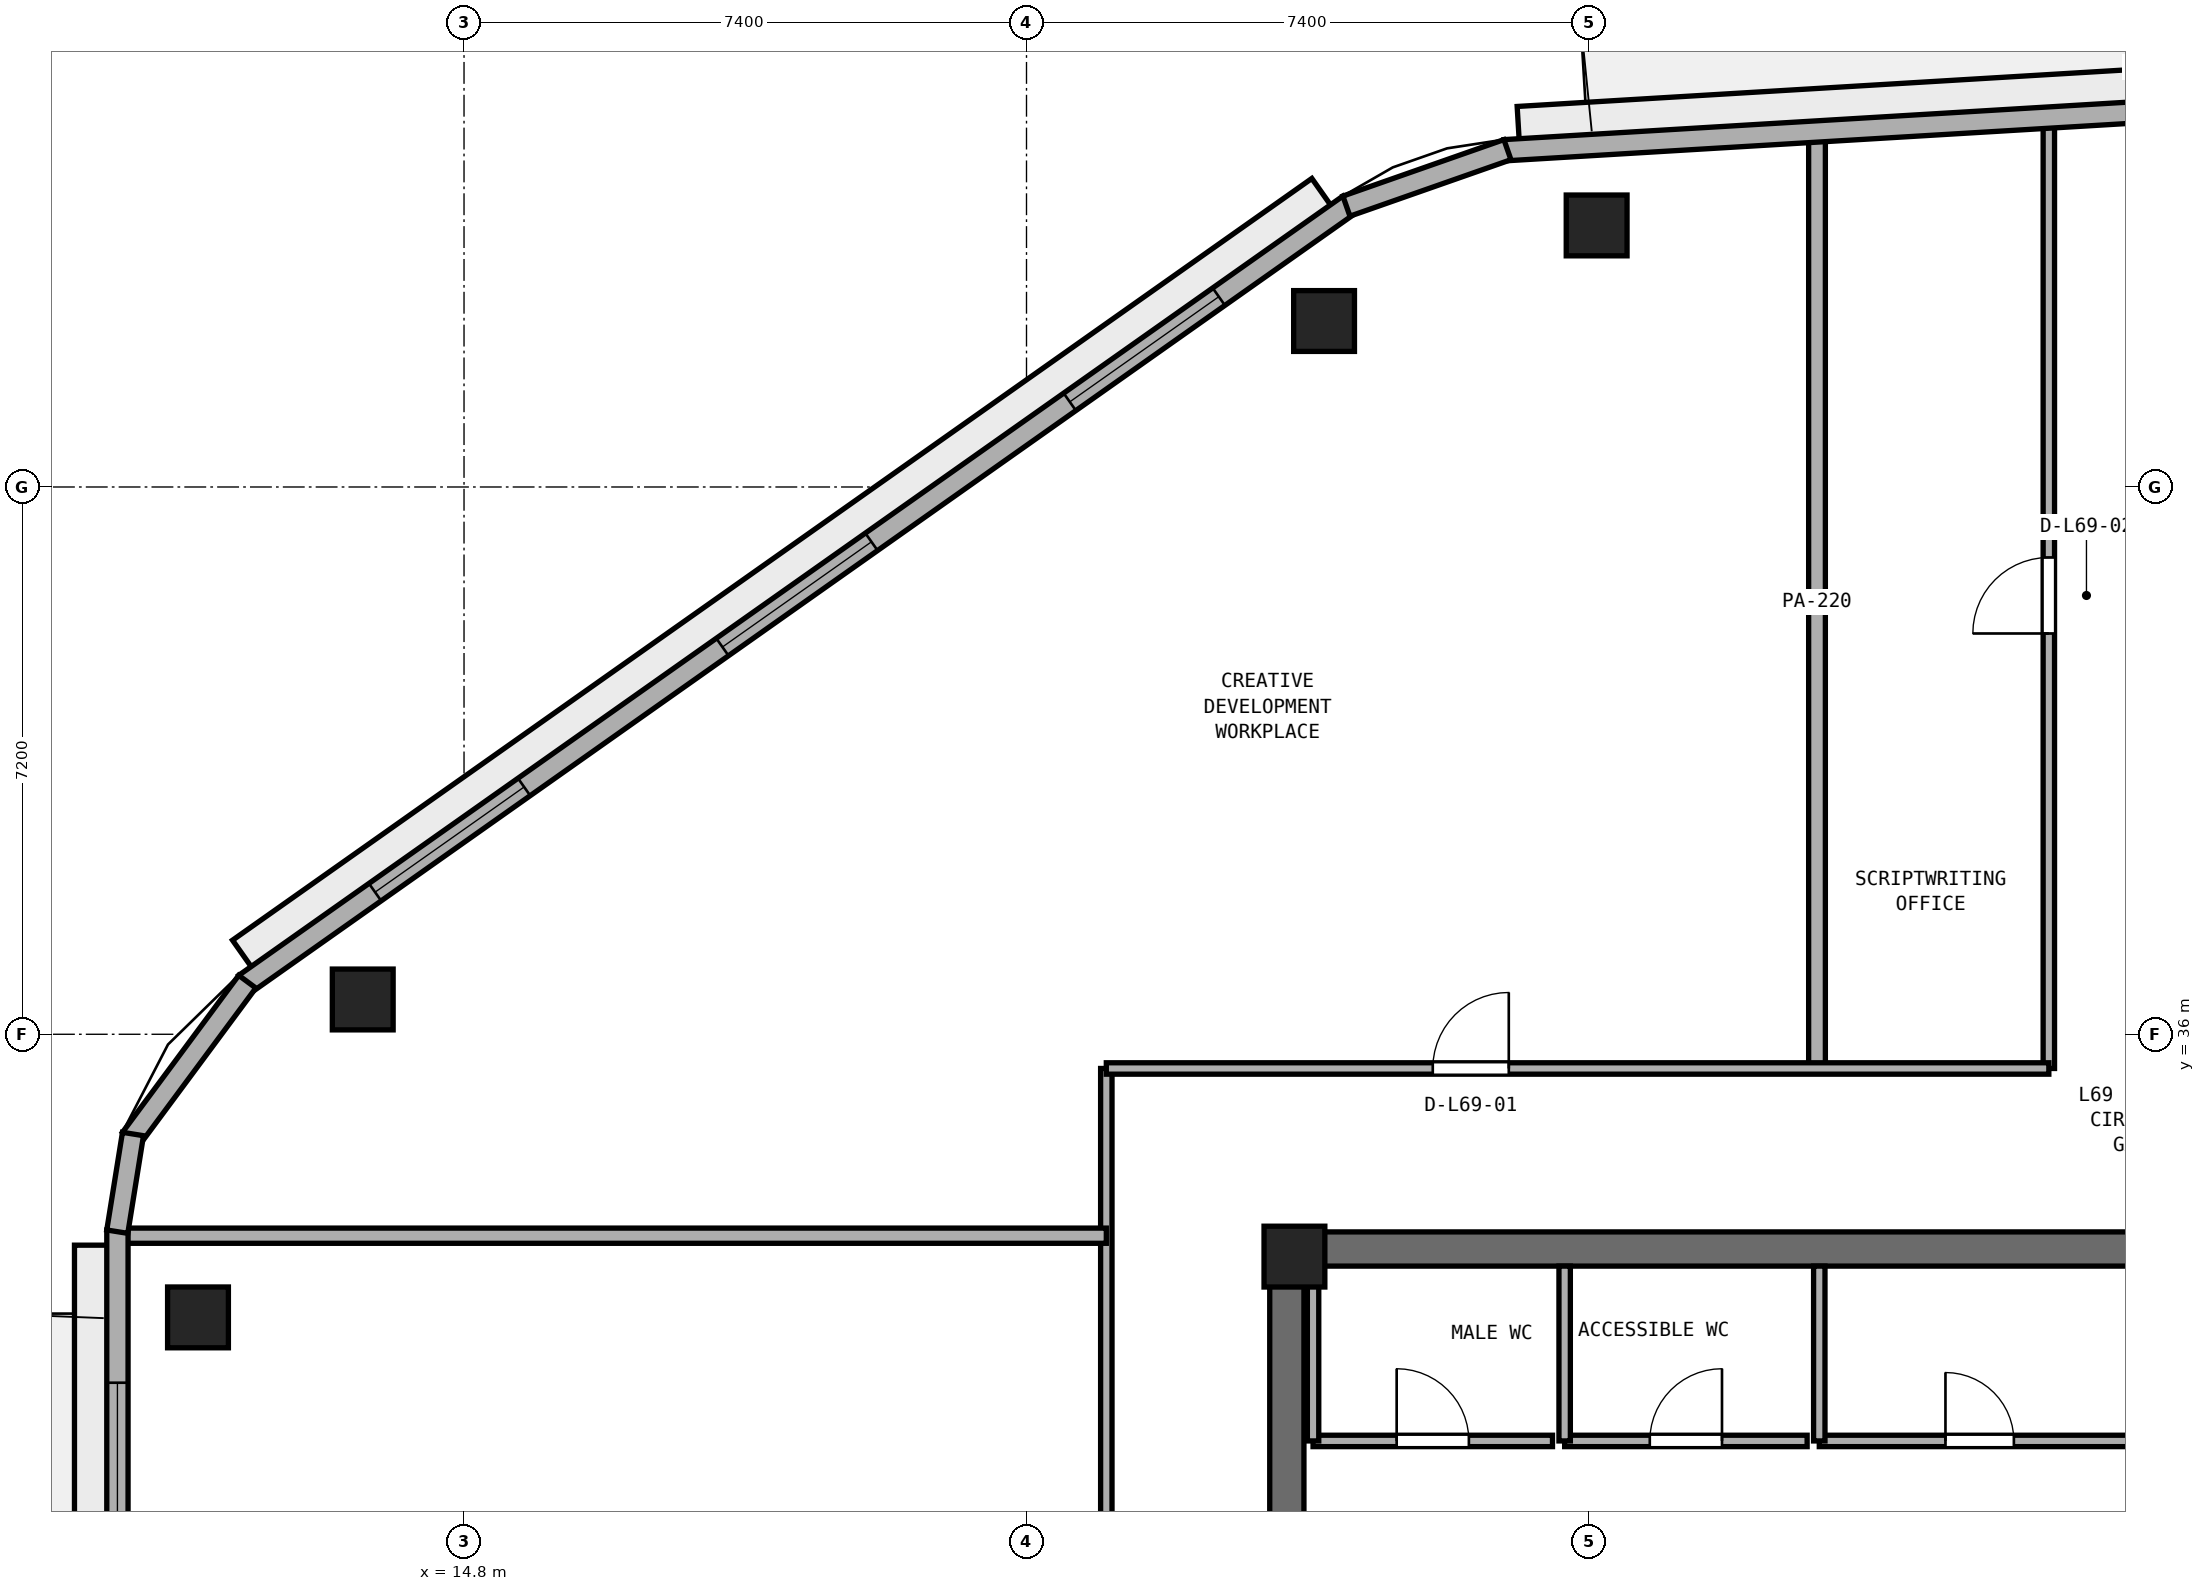
"""IFC4 building model, lengths in metres.
Left out: names, types, materials, properties, quantities, classifications, styles, units other than length and angle.
Written with IfcOpenShell. Run it as: python <this file> out.ifc"""

import sys

from ifc_helpers import new_model, si_unit, direction, frame, frame_2d, origin, origin_2d, place, context, subcontext, project, spatial, rectangle, extrude, element, fill, save


model = new_model("IFC4")
c1 = context("Model", 3, precision=1e-05, world=origin(), true_north=direction((0.0, 1.0)))
c2 = subcontext(c1, "Body", "Model", "MODEL_VIEW")
j1 = project(units=[si_unit("LENGTHUNIT", "METRE"), si_unit("PLANEANGLEUNIT", "RADIAN")], contexts=[c1])
p1 = place(None, origin())
s1 = spatial("IfcSite", under=j1, at=p1, CompositionType="ELEMENT")
p2 = place(p1, origin())
s2 = spatial("IfcBuilding", under=s1, at=p2, CompositionType="ELEMENT")
p3 = place(p2, frame((0.0, 0.0, 270.6)))
s3 = spatial("IfcBuildingStorey", under=s2, at=p3, CompositionType="ELEMENT", Elevation=270.6)
p4 = place(p3, frame((25.4, 33.175, 0.0), z_axis=(0.0, 0.0, 1.0), x_axis=(1.0, 0.0, 0.0)))
e1 = element("IfcWall", 1, at=p4, inside=s3, PredefinedType="SHEAR", context=c2, shape_type="SweptSolid", body=[
    extrude(rectangle(XDim=23.2, YDim=0.45, at=frame_2d((11.6, 0.0))), origin(), (0.0, 0.0, 1.0), 3.54),
])
p5 = place(p3, frame((25.625, 17.45, 0.0), z_axis=(0.0, 0.0, 1.0), x_axis=(0.0, 1.0, 0.0)))
e2 = element("IfcWall", 2, at=p5, inside=s3, PredefinedType="SHEAR", context=c2, shape_type="SweptSolid", body=[
    extrude(rectangle(XDim=15.5, YDim=0.45, at=frame_2d((7.75, 0.0))), origin(), (0.0, 0.0, 1.0), 3.54),
])
p6 = place(p5, frame((7.0, 0.0, 0.0)))
e3 = element("IfcOpeningElement", 3, at=p6, cuts=e2, PredefinedType="OPENING", context=c2, shape_type="SweptSolid", body=[
    extrude(rectangle(XDim=1.5, YDim=2.15, at=frame_2d((0.75, 1.075))), frame((0.0, 0.235, 0.0), z_axis=(0.0, -1.0, 0.0), x_axis=(1.0, 0.0, 0.0)), (0.0, 0.0, 1.0), 0.47),
])
p7 = place(p3, frame((25.725, 33.075, 0.0), z_axis=(0.0, 0.0, 1.0), x_axis=(1.0, 0.0, 0.0)))
e4 = element("IfcColumn", 4, at=p7, inside=s3, PredefinedType="PILASTER", context=c2, shape_type="SweptSolid", body=[
    extrude(rectangle(XDim=0.8, YDim=0.8, at=origin_2d()), origin(), (0.0, 0.0, 1.0), 3.8),
])
for number, where, z_axis, x_axis in (
    (5, (29.701, 46.641, 0.0), (0.0, 0.0, 1.0), (1.0, 0.0, 0.0)),
    (6, (26.115, 45.384, 0.0), (0.0, 0.0, 1.0), (1.0, 0.0, 0.0)),
    (7, (13.467, 36.458, 0.0), (0.0, 0.0, 1.0), (1.0, 0.0, 0.0)),
    (8, (11.3, 32.275, 0.0), (0.0, 0.0, 1.0), (1.0, 0.0, 0.0)),
):
    element("IfcColumn", number, at=place(p3, frame(where, z_axis=z_axis, x_axis=x_axis)), inside=s3, PredefinedType="COLUMN", context=c2, shape_type="SweptSolid", body=[
        extrude(rectangle(XDim=0.8, YDim=0.8, at=origin_2d()), origin(), (0.0, 0.0, 1.0), 3.8),
    ])
p8 = place(p3, frame((25.97, 30.65, 0.0), z_axis=(0.0, 0.0, 1.0), x_axis=(1.0, 0.0, 0.0)))
e9 = element("IfcWall", 9, at=p8, inside=s3, PredefinedType="PARTITIONING", context=c2, shape_type="SweptSolid", body=[
    extrude(rectangle(XDim=3.15, YDim=0.15, at=frame_2d((1.575, 0.0))), origin(), (0.0, 0.0, 1.0), 3.54),
])
p9 = place(p8, frame((1.1, 0.0, 0.0)))
e10 = element("IfcOpeningElement", 10, at=p9, cuts=e9, PredefinedType="OPENING", context=c2, shape_type="SweptSolid", body=[
    extrude(rectangle(XDim=0.95, YDim=2.1, at=frame_2d((0.475, 1.05))), frame((0.0, 0.085, 0.0), z_axis=(0.0, -1.0, 0.0), x_axis=(1.0, 0.0, 0.0)), (0.0, 0.0, 1.0), 0.17),
])
p10 = place(p3, frame((25.97, 30.65, 0.0), z_axis=(0.0, 0.0, 1.0), x_axis=(0.0, 1.0, 0.0)))
e11 = element("IfcWall", 11, at=p10, inside=s3, PredefinedType="PARTITIONING", context=c2, shape_type="SweptSolid", body=[
    extrude(rectangle(XDim=2.3, YDim=0.15, at=frame_2d((1.15, 0.0))), origin(), (0.0, 0.0, 1.0), 2.64),
])
p11 = place(p3, frame((29.28, 30.65, 0.0), z_axis=(0.0, 0.0, 1.0), x_axis=(1.0, 0.0, 0.0)))
e12 = element("IfcWall", 12, at=p11, inside=s3, PredefinedType="PARTITIONING", context=c2, shape_type="SweptSolid", body=[
    extrude(rectangle(XDim=3.19, YDim=0.15, at=frame_2d((1.595, 0.0))), origin(), (0.0, 0.0, 1.0), 3.54),
])
p12 = place(p11, frame((1.12, 0.0, 0.0)))
e13 = element("IfcOpeningElement", 13, at=p12, cuts=e12, PredefinedType="OPENING", context=c2, shape_type="SweptSolid", body=[
    extrude(rectangle(XDim=0.95, YDim=2.1, at=frame_2d((0.475, 1.05))), frame((0.0, 0.085, 0.0), z_axis=(0.0, -1.0, 0.0), x_axis=(1.0, 0.0, 0.0)), (0.0, 0.0, 1.0), 0.17),
])
p13 = place(p3, frame((29.28, 30.65, 0.0), z_axis=(0.0, 0.0, 1.0), x_axis=(0.0, 1.0, 0.0)))
e14 = element("IfcWall", 14, at=p13, inside=s3, PredefinedType="PARTITIONING", context=c2, shape_type="SweptSolid", body=[
    extrude(rectangle(XDim=2.3, YDim=0.15, at=frame_2d((1.15, 0.0))), origin(), (0.0, 0.0, 1.0), 3.54),
])
p14 = place(p3, frame((32.63, 30.65, 0.0), z_axis=(0.0, 0.0, 1.0), x_axis=(1.0, 0.0, 0.0)))
e15 = element("IfcWall", 15, at=p14, inside=s3, PredefinedType="PARTITIONING", context=c2, shape_type="SweptSolid", body=[
    extrude(rectangle(XDim=4.22, YDim=0.15, at=frame_2d((2.11, 0.0))), origin(), (0.0, 0.0, 1.0), 3.54),
])
p15 = place(p14, frame((1.66, 0.0, 0.0)))
e16 = element("IfcOpeningElement", 16, at=p15, cuts=e15, PredefinedType="OPENING", context=c2, shape_type="SweptSolid", body=[
    extrude(rectangle(XDim=0.9, YDim=2.1, at=frame_2d((0.45, 1.05))), frame((0.0, 0.085, 0.0), z_axis=(0.0, -1.0, 0.0), x_axis=(1.0, 0.0, 0.0)), (0.0, 0.0, 1.0), 0.17),
])
p16 = place(p3, frame((32.63, 30.65, 0.0), z_axis=(0.0, 0.0, 1.0), x_axis=(0.0, 1.0, 0.0)))
e17 = element("IfcWall", 17, at=p16, inside=s3, PredefinedType="PARTITIONING", context=c2, shape_type="SweptSolid", body=[
    extrude(rectangle(XDim=2.3, YDim=0.15, at=frame_2d((1.15, 0.0))), origin(), (0.0, 0.0, 1.0), 3.54),
])
p17 = place(p3, frame((35.65, 35.55, 0.0), z_axis=(0.0, 0.0, 1.0), x_axis=(0.0, 1.0, 0.0)))
e18 = element("IfcWall", 18, at=p17, inside=s3, PredefinedType="PARTITIONING", context=c2, shape_type="SweptSolid", body=[
    extrude(rectangle(XDim=12.445, YDim=0.15, at=frame_2d((6.223, 0.0))), origin(), (0.0, 0.0, 1.0), 3.54),
])
p18 = place(p17, frame((5.723, 0.0, 0.0)))
e19 = element("IfcOpeningElement", 19, at=p18, cuts=e18, PredefinedType="OPENING", context=c2, shape_type="SweptSolid", body=[
    extrude(rectangle(XDim=1.0, YDim=2.12, at=frame_2d((0.5, 1.06))), frame((0.0, 0.085, 0.0), z_axis=(0.0, -1.0, 0.0), x_axis=(1.0, 0.0, 0.0)), (0.0, 0.0, 1.0), 0.17),
])
p19 = place(p3, frame((32.6, 35.55, 0.0), z_axis=(0.0, 0.0, 1.0), x_axis=(0.0, 1.0, 0.0)))
e20 = element("IfcWall", 20, at=p19, inside=s3, PredefinedType="PARTITIONING", context=c2, shape_type="SweptSolid", body=[
    extrude(rectangle(XDim=12.262, YDim=0.22, at=frame_2d((6.131, 0.0))), origin(), (0.0, 0.0, 1.0), 3.54),
])
p20 = place(p3, frame((23.25, 14.85, 0.0), z_axis=(0.0, 0.0, 1.0), x_axis=(0.0, 1.0, 0.0)))
e21 = element("IfcWall", 21, at=p20, inside=s3, PredefinedType="PARTITIONING", context=c2, shape_type="SweptSolid", body=[
    extrude(rectangle(XDim=20.7, YDim=0.15, at=frame_2d((10.35, 0.0))), origin(), (0.0, 0.0, 1.0), 3.54),
])
p21 = place(p20, frame((9.9, 0.0, 0.0)))
e22 = element("IfcOpeningElement", 22, at=p21, cuts=e21, PredefinedType="OPENING", context=c2, shape_type="SweptSolid", body=[
    extrude(rectangle(XDim=0.9, YDim=2.1, at=frame_2d((0.45, 1.05))), frame((0.0, 0.085, 0.0), z_axis=(0.0, -1.0, 0.0), x_axis=(1.0, 0.0, 0.0)), (0.0, 0.0, 1.0), 0.17),
])
p22 = place(p3, frame((10.305, 33.35, 0.0), z_axis=(0.0, 0.0, 1.0), x_axis=(1.0, 0.0, 0.0)))
e23 = element("IfcWall", 23, at=p22, inside=s3, PredefinedType="PARTITIONING", context=c2, shape_type="SweptSolid", body=[
    extrude(rectangle(XDim=12.945, YDim=0.2, at=frame_2d((6.473, 0.0))), origin(), (0.0, 0.0, 1.0), 2.19),
])
p23 = place(p3, frame((23.25, 35.55, 0.0), z_axis=(0.0, 0.0, 1.0), x_axis=(1.0, 0.0, 0.0)))
e24 = element("IfcWall", 24, at=p23, inside=s3, PredefinedType="PARTITIONING", context=c2, shape_type="SweptSolid", body=[
    extrude(rectangle(XDim=12.4, YDim=0.15, at=frame_2d((6.2, 0.0))), origin(), (0.0, 0.0, 1.0), 3.54),
])
p24 = place(p23, frame((4.295, 0.0, 0.0)))
e25 = element("IfcOpeningElement", 25, at=p24, cuts=e24, PredefinedType="OPENING", context=c2, shape_type="SweptSolid", body=[
    extrude(rectangle(XDim=1.0, YDim=2.12, at=frame_2d((0.5, 1.06))), frame((0.0, 0.085, 0.0), z_axis=(0.0, -1.0, 0.0), x_axis=(1.0, 0.0, 0.0)), (0.0, 0.0, 1.0), 0.17),
])
p25 = place(p3, frame((47.566, 48.775, 0.0), z_axis=(0.0, 0.0, 1.0), x_axis=(-0.998202767485, -0.059926913695, 0.0)))
e26 = element("IfcWall", 26, at=p25, inside=s3, PredefinedType="STANDARD", context=c2, shape_type="SweptSolid", body=[
    extrude(rectangle(XDim=19.111, YDim=0.28, at=frame_2d((9.556, 0.0))), origin(), (0.0, 0.0, 1.0), 3.54),
])
p26 = place(p25, frame((9.656, 0.0, 0.0)))
e27 = element("IfcOpeningElement", 27, at=p26, cuts=e26, PredefinedType="OPENING", context=c2, shape_type="SweptSolid", body=[
    extrude(rectangle(XDim=1.1, YDim=2.2, at=frame_2d((0.55, 1.1))), frame((0.0, 0.15, 0.0), z_axis=(0.0, -1.0, 0.0), x_axis=(1.0, 0.0, 0.0)), (0.0, 0.0, 1.0), 0.3),
])
p27 = place(p3, frame((26.443, 46.913, 0.0), z_axis=(0.0, 0.0, 1.0), x_axis=(-0.817024179766, -0.576603407619, 0.0)))
e28 = element("IfcWall", 28, at=p27, inside=s3, PredefinedType="STANDARD", context=c2, shape_type="SweptSolid", body=[
    extrude(rectangle(XDim=17.78, YDim=0.28, at=frame_2d((8.89, 0.0))), origin(), (0.0, 0.0, 1.0), 3.54),
])
p28 = place(p27, frame((2.097, 0.0, 0.9)))
e29 = element("IfcOpeningElement", 29, at=p28, cuts=e28, PredefinedType="OPENING", context=c2, shape_type="SweptSolid", body=[
    extrude(rectangle(XDim=2.4, YDim=1.75, at=frame_2d((1.2, 0.875))), frame((0.0, 0.15, 0.0), z_axis=(0.0, -1.0, 0.0), x_axis=(1.0, 0.0, 0.0)), (0.0, 0.0, 1.0), 0.3),
])
p29 = place(p27, frame((7.69, 0.0, 0.9)))
e30 = element("IfcOpeningElement", 30, at=p29, cuts=e28, PredefinedType="OPENING", context=c2, shape_type="SweptSolid", body=[
    extrude(rectangle(XDim=2.4, YDim=1.75, at=frame_2d((1.2, 0.875))), frame((0.0, 0.15, 0.0), z_axis=(0.0, -1.0, 0.0), x_axis=(1.0, 0.0, 0.0)), (0.0, 0.0, 1.0), 0.3),
])
p30 = place(p27, frame((13.283, 0.0, 0.9)))
e31 = element("IfcOpeningElement", 31, at=p30, cuts=e28, PredefinedType="OPENING", context=c2, shape_type="SweptSolid", body=[
    extrude(rectangle(XDim=2.4, YDim=1.75, at=frame_2d((1.2, 0.875))), frame((0.0, 0.15, 0.0), z_axis=(0.0, -1.0, 0.0), x_axis=(1.0, 0.0, 0.0)), (0.0, 0.0, 1.0), 0.3),
])
p31 = place(p3, frame((10.24, 33.425, 0.0), z_axis=(0.0, 0.0, 1.0), x_axis=(0.0, -1.0, 0.0)))
e32 = element("IfcWall", 32, at=p31, inside=s3, PredefinedType="STANDARD", context=c2, shape_type="SweptSolid", body=[
    extrude(rectangle(XDim=17.257, YDim=0.28, at=frame_2d((8.628, 0.0))), origin(), (0.0, 0.0, 1.0), 3.54),
])
p32 = place(p31, frame((8.078, 0.0, 0.0)))
e33 = element("IfcOpeningElement", 33, at=p32, cuts=e32, PredefinedType="OPENING", context=c2, shape_type="SweptSolid", body=[
    extrude(rectangle(XDim=1.1, YDim=2.2, at=frame_2d((0.55, 1.1))), frame((0.0, 0.15, 0.0), z_axis=(0.0, -1.0, 0.0), x_axis=(1.0, 0.0, 0.0)), (0.0, 0.0, 1.0), 0.3),
])
p33 = place(p31, frame((2.01, 0.0, 0.9)))
e34 = element("IfcOpeningElement", 34, at=p33, cuts=e32, PredefinedType="OPENING", context=c2, shape_type="SweptSolid", body=[
    extrude(rectangle(XDim=2.4, YDim=1.75, at=frame_2d((1.2, 0.875))), frame((0.0, 0.15, 0.0), z_axis=(0.0, -1.0, 0.0), x_axis=(1.0, 0.0, 0.0)), (0.0, 0.0, 1.0), 0.3),
])
p34 = place(p31, frame((12.847, 0.0, 0.9)))
e35 = element("IfcOpeningElement", 35, at=p34, cuts=e32, PredefinedType="OPENING", context=c2, shape_type="SweptSolid", body=[
    extrude(rectangle(XDim=2.4, YDim=1.75, at=frame_2d((1.2, 0.875))), frame((0.0, 0.15, 0.0), z_axis=(0.0, -1.0, 0.0), x_axis=(1.0, 0.0, 0.0)), (0.0, 0.0, 1.0), 0.3),
])
p35 = place(p3, frame((28.527, 47.638, 0.0), z_axis=(0.0, 0.0, 1.0), x_axis=(-0.943686979207, -0.330839667022, 0.0)))
e36 = element("IfcWall", 36, at=p35, inside=s3, PredefinedType="STANDARD", context=c2, shape_type="SweptSolid", body=[
    extrude(rectangle(XDim=2.245, YDim=0.28, at=frame_2d((1.123, 0.0))), origin(), (0.0, 0.0, 1.0), 3.54),
])
p36 = place(p3, frame((11.948, 36.692, 0.0), z_axis=(0.0, 0.0, 1.0), x_axis=(-0.595170751493, -0.803599263668, 0.0)))
e37 = element("IfcWall", 37, at=p36, inside=s3, PredefinedType="STANDARD", context=c2, shape_type="SweptSolid", body=[
    extrude(rectangle(XDim=2.57, YDim=0.28, at=frame_2d((1.285, 0.0))), origin(), (0.0, 0.0, 1.0), 3.54),
])
p37 = place(p3, frame((10.445, 34.688, 0.0), z_axis=(0.0, 0.0, 1.0), x_axis=(-0.158524605336, -0.987355027081, 0.0)))
e38 = element("IfcWall", 38, at=p37, inside=s3, PredefinedType="STANDARD", context=c2, shape_type="SweptSolid", body=[
    extrude(rectangle(XDim=1.301, YDim=0.28, at=frame_2d((0.651, 0.0))), origin(), (0.0, 0.0, 1.0), 3.54),
])
p38 = place(p9, origin())
e39 = element("IfcDoor", 39, at=p38, inside=s3, OperationType="SINGLE_SWING_LEFT", PredefinedType="DOOR", context=c2, shape_type="SweptSolid", body=[
    extrude(rectangle(XDim=0.95, YDim=2.1, at=frame_2d((0.475, 1.05))), frame((0.0, 0.025, 0.0), z_axis=(0.0, -1.0, 0.0), x_axis=(1.0, 0.0, 0.0)), (0.0, 0.0, 1.0), 0.05),
])
fill(e10, e39)
p39 = place(p12, origin())
e40 = element("IfcDoor", 40, at=p39, inside=s3, OperationType="SINGLE_SWING_RIGHT", PredefinedType="DOOR", context=c2, shape_type="SweptSolid", body=[
    extrude(rectangle(XDim=0.95, YDim=2.1, at=frame_2d((0.475, 1.05))), frame((0.0, 0.025, 0.0), z_axis=(0.0, -1.0, 0.0), x_axis=(1.0, 0.0, 0.0)), (0.0, 0.0, 1.0), 0.05),
])
fill(e13, e40)
p40 = place(p15, origin())
e41 = element("IfcDoor", 41, at=p40, inside=s3, OperationType="SINGLE_SWING_LEFT", PredefinedType="DOOR", context=c2, shape_type="SweptSolid", body=[
    extrude(rectangle(XDim=0.9, YDim=2.1, at=frame_2d((0.45, 1.05))), frame((0.0, 0.025, 0.0), z_axis=(0.0, -1.0, 0.0), x_axis=(1.0, 0.0, 0.0)), (0.0, 0.0, 1.0), 0.05),
])
fill(e16, e41)
p41 = place(p24, origin())
e42 = element("IfcDoor", 42, at=p41, inside=s3, OperationType="SINGLE_SWING_RIGHT", PredefinedType="DOOR", context=c2, shape_type="SweptSolid", body=[
    extrude(rectangle(XDim=1.0, YDim=2.12, at=frame_2d((0.5, 1.06))), frame((0.0, 0.025, 0.0), z_axis=(0.0, -1.0, 0.0), x_axis=(1.0, 0.0, 0.0)), (0.0, 0.0, 1.0), 0.05),
])
fill(e25, e42)
p42 = place(p18, origin())
e43 = element("IfcDoor", 43, at=p42, inside=s3, OperationType="SINGLE_SWING_LEFT", PredefinedType="DOOR", context=c2, shape_type="SweptSolid", body=[
    extrude(rectangle(XDim=1.0, YDim=2.12, at=frame_2d((0.5, 1.06))), frame((0.0, 0.025, 0.0), z_axis=(0.0, -1.0, 0.0), x_axis=(1.0, 0.0, 0.0)), (0.0, 0.0, 1.0), 0.05),
])
fill(e19, e43)
p43 = place(p28, origin())
e44 = element("IfcWindow", 44, at=p43, inside=s3, PartitioningType="SINGLE_PANEL", PredefinedType="WINDOW", context=c2, shape_type="SweptSolid", body=[
    extrude(rectangle(XDim=2.4, YDim=1.75, at=frame_2d((1.2, 0.875))), frame((0.0, 0.03, 0.0), z_axis=(0.0, -1.0, 0.0), x_axis=(1.0, 0.0, 0.0)), (0.0, 0.0, 1.0), 0.06),
])
fill(e29, e44)
p44 = place(p29, origin())
e45 = element("IfcWindow", 45, at=p44, inside=s3, PartitioningType="SINGLE_PANEL", PredefinedType="WINDOW", context=c2, shape_type="SweptSolid", body=[
    extrude(rectangle(XDim=2.4, YDim=1.75, at=frame_2d((1.2, 0.875))), frame((0.0, 0.03, 0.0), z_axis=(0.0, -1.0, 0.0), x_axis=(1.0, 0.0, 0.0)), (0.0, 0.0, 1.0), 0.06),
])
fill(e30, e45)
p45 = place(p30, origin())
e46 = element("IfcWindow", 46, at=p45, inside=s3, PartitioningType="SINGLE_PANEL", PredefinedType="WINDOW", context=c2, shape_type="SweptSolid", body=[
    extrude(rectangle(XDim=2.4, YDim=1.75, at=frame_2d((1.2, 0.875))), frame((0.0, 0.03, 0.0), z_axis=(0.0, -1.0, 0.0), x_axis=(1.0, 0.0, 0.0)), (0.0, 0.0, 1.0), 0.06),
])
fill(e31, e46)
p46 = place(p33, origin())
e47 = element("IfcWindow", 47, at=p46, inside=s3, PartitioningType="SINGLE_PANEL", PredefinedType="WINDOW", context=c2, shape_type="SweptSolid", body=[
    extrude(rectangle(XDim=2.4, YDim=1.75, at=frame_2d((1.2, 0.875))), frame((0.0, 0.03, 0.0), z_axis=(0.0, -1.0, 0.0), x_axis=(1.0, 0.0, 0.0)), (0.0, 0.0, 1.0), 0.06),
])
fill(e34, e47)
save(model, sys.argv[1])
